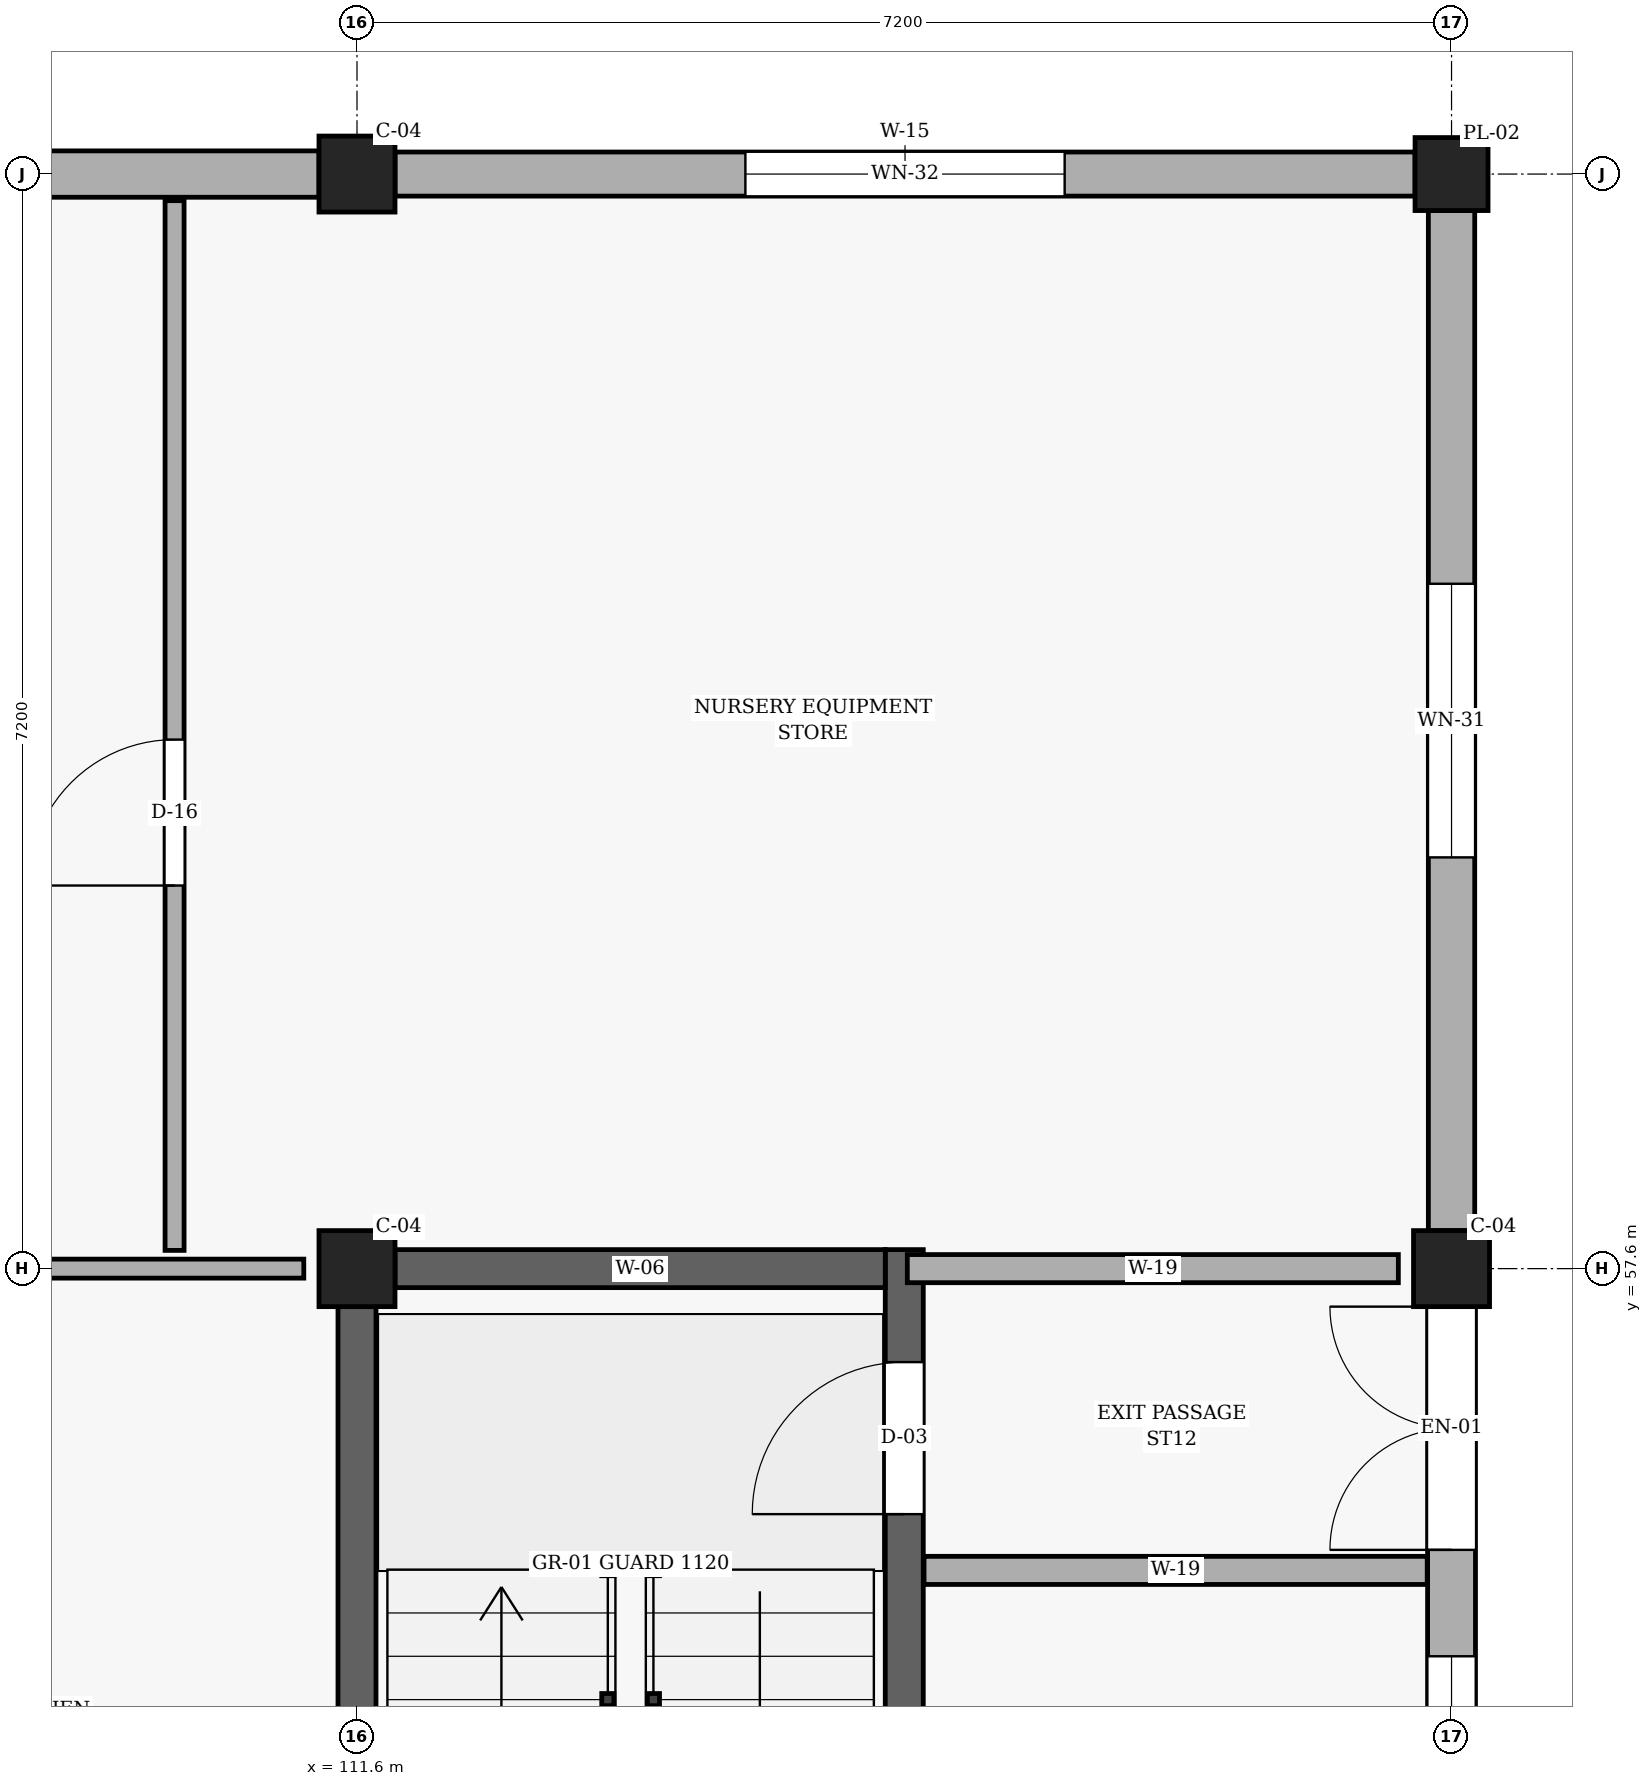
"""IFC4 building model, lengths in metres.
Left out: names, types, materials, properties, quantities, classifications, styles, units other than length and angle.
Written with IfcOpenShell. Run it as: python <this file> out.ifc"""

import sys

from ifc_helpers import new_model, si_unit, direction, frame, frame_2d, origin, origin_2d, place, context, subcontext, project, spatial, rectangle, extrude, element, fill, save


model = new_model("IFC4")
c1 = context("Model", 3, precision=1e-05, world=origin(), true_north=direction((0.0, 1.0)))
c2 = subcontext(c1, "Body", "Model", "MODEL_VIEW")
j1 = project(units=[si_unit("LENGTHUNIT", "METRE"), si_unit("PLANEANGLEUNIT", "RADIAN")], contexts=[c1])
p1 = place(None, origin())
s1 = spatial("IfcSite", under=j1, at=p1, CompositionType="ELEMENT")
p2 = place(p1, origin())
s2 = spatial("IfcBuilding", under=s1, at=p2, CompositionType="ELEMENT")
p3 = place(p2, origin())
s3 = spatial("IfcBuildingStorey", under=s2, at=p3, CompositionType="ELEMENT", Elevation=0.0)
for number, where, z_axis, x_axis in (
    (1, (111.6, 57.6, 0.0), (0.0, 0.0, 1.0), (1.0, 0.0, 0.0)),
    (2, (111.6, 64.8, 0.0), (0.0, 0.0, 1.0), (1.0, 0.0, 0.0)),
    (3, (118.8, 57.6, 0.0), (0.0, 0.0, 1.0), (1.0, 0.0, 0.0)),
):
    element("IfcColumn", number, at=place(p3, frame(where, z_axis=z_axis, x_axis=x_axis)), inside=s3, PredefinedType="COLUMN", context=c2, shape_type="SweptSolid", body=[
        extrude(rectangle(XDim=0.5, YDim=0.5, at=origin_2d()), origin(), (0.0, 0.0, 1.0), 4.5),
    ])
p4 = place(p3, frame((118.8, 64.8, 0.0), z_axis=(0.0, 0.0, 1.0), x_axis=(1.0, 0.0, 0.0)))
e4 = element("IfcColumn", 4, at=p4, inside=s3, PredefinedType="PILASTER", context=c2, shape_type="SweptSolid", body=[
    extrude(rectangle(XDim=0.48, YDim=0.48, at=origin_2d()), origin(), (0.0, 0.0, 1.0), 4.5),
])
p5 = place(p3, frame((118.8, 50.65, 0.0), z_axis=(0.0, 0.0, 1.0), x_axis=(0.0, 1.0, 0.0)))
e5 = element("IfcWall", 5, at=p5, inside=s3, PredefinedType="SOLIDWALL", context=c2, shape_type="SweptSolid", body=[
    extrude(rectangle(XDim=6.7, YDim=0.315, at=frame_2d((3.35, 0.0))), origin(), (0.0, 0.0, 1.0), 3.83),
])
p6 = place(p5, frame((2.3, 0.0, 0.85)))
e6 = element("IfcOpeningElement", 6, at=p6, cuts=e5, PredefinedType="OPENING", context=c2, shape_type="SweptSolid", body=[
    extrude(rectangle(XDim=2.1, YDim=2.1, at=frame_2d((1.05, 1.05))), frame((0.0, 0.167, 0.0), z_axis=(0.0, -1.0, 0.0), x_axis=(1.0, 0.0, 0.0)), (0.0, 0.0, 1.0), 0.335),
])
p7 = place(p5, frame((5.1, 0.0, 0.0)))
e7 = element("IfcOpeningElement", 7, at=p7, cuts=e5, PredefinedType="OPENING", context=c2, shape_type="SweptSolid", body=[
    extrude(rectangle(XDim=1.6, YDim=2.25, at=frame_2d((0.8, 1.125))), frame((0.0, 0.167, 0.0), z_axis=(0.0, -1.0, 0.0), x_axis=(1.0, 0.0, 0.0)), (0.0, 0.0, 1.0), 0.335),
])
p8 = place(p3, frame((118.8, 57.85, 0.0), z_axis=(0.0, 0.0, 1.0), x_axis=(0.0, 1.0, 0.0)))
e8 = element("IfcWall", 8, at=p8, inside=s3, PredefinedType="SOLIDWALL", context=c2, shape_type="SweptSolid", body=[
    extrude(rectangle(XDim=6.71, YDim=0.305, at=frame_2d((3.355, 0.0))), origin(), (0.0, 0.0, 1.0), 3.83),
])
p9 = place(p8, frame((2.455, 0.0, 0.85)))
e9 = element("IfcOpeningElement", 9, at=p9, cuts=e8, PredefinedType="OPENING", context=c2, shape_type="SweptSolid", body=[
    extrude(rectangle(XDim=1.8, YDim=2.1, at=frame_2d((0.9, 1.05))), frame((0.0, 0.163, 0.0), z_axis=(0.0, -1.0, 0.0), x_axis=(1.0, 0.0, 0.0)), (0.0, 0.0, 1.0), 0.325),
])
p10 = place(p3, frame((118.56, 64.8, 0.0), z_axis=(0.0, 0.0, 1.0), x_axis=(-1.0, 0.0, 0.0)))
e10 = element("IfcWall", 10, at=p10, inside=s3, PredefinedType="SOLIDWALL", context=c2, shape_type="SweptSolid", body=[
    extrude(rectangle(XDim=6.71, YDim=0.29, at=frame_2d((3.355, 0.0))), origin(), (0.0, 0.0, 1.0), 3.83),
])
p11 = place(p10, frame((2.305, 0.0, 0.85)))
e11 = element("IfcOpeningElement", 11, at=p11, cuts=e10, PredefinedType="OPENING", context=c2, shape_type="SweptSolid", body=[
    extrude(rectangle(XDim=2.1, YDim=2.1, at=frame_2d((1.05, 1.05))), frame((0.0, 0.155, 0.0), z_axis=(0.0, -1.0, 0.0), x_axis=(1.0, 0.0, 0.0)), (0.0, 0.0, 1.0), 0.31),
])
p12 = place(p3, frame((111.35, 64.8, 0.0), z_axis=(0.0, 0.0, 1.0), x_axis=(-1.0, 0.0, 0.0)))
e12 = element("IfcWall", 12, at=p12, inside=s3, PredefinedType="SOLIDWALL", context=c2, shape_type="SweptSolid", body=[
    extrude(rectangle(XDim=6.7, YDim=0.305, at=frame_2d((3.35, 0.0))), origin(), (0.0, 0.0, 1.0), 3.83),
])
p13 = place(p12, frame((2.855, 0.0, 0.85)))
e13 = element("IfcOpeningElement", 13, at=p13, cuts=e12, PredefinedType="OPENING", context=c2, shape_type="SweptSolid", body=[
    extrude(rectangle(XDim=1.8, YDim=2.1, at=frame_2d((0.9, 1.05))), frame((0.0, 0.163, 0.0), z_axis=(0.0, -1.0, 0.0), x_axis=(1.0, 0.0, 0.0)), (0.0, 0.0, 1.0), 0.325),
])
p14 = place(p3, frame((111.6, 50.65, 0.0), z_axis=(0.0, 0.0, 1.0), x_axis=(0.0, 1.0, 0.0)))
e14 = element("IfcWall", 14, at=p14, inside=s3, PredefinedType="SHEAR", context=c2, shape_type="SweptSolid", body=[
    extrude(rectangle(XDim=6.7, YDim=0.25, at=frame_2d((3.35, 0.0))), origin(), (0.0, 0.0, 1.0), 4.26),
])
p15 = place(p3, frame((115.2, 50.275, 0.0), z_axis=(0.0, 0.0, 1.0), x_axis=(0.0, 1.0, 0.0)))
e15 = element("IfcWall", 15, at=p15, inside=s3, PredefinedType="SHEAR", context=c2, shape_type="SweptSolid", body=[
    extrude(rectangle(XDim=7.45, YDim=0.25, at=frame_2d((3.725, 0.0))), origin(), (0.0, 0.0, 1.0), 4.26),
])
p16 = place(p15, frame((5.71, 0.0, 0.0)))
e16 = element("IfcOpeningElement", 16, at=p16, cuts=e15, PredefinedType="OPENING", context=c2, shape_type="SweptSolid", body=[
    extrude(rectangle(XDim=1.0, YDim=2.15, at=frame_2d((0.5, 1.075))), frame((0.0, 0.135, 0.0), z_axis=(0.0, -1.0, 0.0), x_axis=(1.0, 0.0, 0.0)), (0.0, 0.0, 1.0), 0.27),
])
p17 = place(p3, frame((111.85, 57.6, 0.0), z_axis=(0.0, 0.0, 1.0), x_axis=(1.0, 0.0, 0.0)))
e17 = element("IfcWall", 17, at=p17, inside=s3, PredefinedType="SHEAR", context=c2, shape_type="SweptSolid", body=[
    extrude(rectangle(XDim=3.225, YDim=0.25, at=frame_2d((1.612, 0.0))), origin(), (0.0, 0.0, 1.0), 4.26),
])
p18 = place(p3, frame((104.75, 57.6, 0.0), z_axis=(0.0, 0.0, 1.0), x_axis=(1.0, 0.0, 0.0)))
e18 = element("IfcWall", 18, at=p18, inside=s3, PredefinedType="PARTITIONING", context=c2, shape_type="SweptSolid", body=[
    extrude(rectangle(XDim=6.5, YDim=0.125, at=frame_2d((3.25, 0.0))), origin(), (0.0, 0.0, 1.0), 3.41),
])
p19 = place(p18, frame((0.55, 0.0, 0.0)))
e19 = element("IfcOpeningElement", 19, at=p19, cuts=e18, PredefinedType="OPENING", context=c2, shape_type="SweptSolid", body=[
    extrude(rectangle(XDim=1.04, YDim=2.12, at=frame_2d((0.52, 1.06))), frame((0.0, 0.073, 0.0), z_axis=(0.0, -1.0, 0.0), x_axis=(1.0, 0.0, 0.0)), (0.0, 0.0, 1.0), 0.145),
])
p20 = place(p3, frame((115.22, 57.6, 0.0), z_axis=(0.0, 0.0, 1.0), x_axis=(1.0, 0.0, 0.0)))
e20 = element("IfcWall", 20, at=p20, inside=s3, PredefinedType="PARTITIONING", context=c2, shape_type="SweptSolid", body=[
    extrude(rectangle(XDim=3.23, YDim=0.185, at=frame_2d((1.615, 0.0))), origin(), (0.0, 0.0, 1.0), 3.41),
])
p21 = place(p3, frame((110.4, 57.72, 0.0), z_axis=(0.0, 0.0, 1.0), x_axis=(0.0, 1.0, 0.0)))
e21 = element("IfcWall", 21, at=p21, inside=s3, PredefinedType="PARTITIONING", context=c2, shape_type="SweptSolid", body=[
    extrude(rectangle(XDim=6.905, YDim=0.125, at=frame_2d((3.453, 0.0))), origin(), (0.0, 0.0, 1.0), 3.41),
])
p22 = place(p21, frame((2.4, 0.0, 0.0)))
e22 = element("IfcOpeningElement", 22, at=p22, cuts=e21, PredefinedType="OPENING", context=c2, shape_type="SweptSolid", body=[
    extrude(rectangle(XDim=0.96, YDim=2.1, at=frame_2d((0.48, 1.05))), frame((0.0, 0.073, 0.0), z_axis=(0.0, -1.0, 0.0), x_axis=(1.0, 0.0, 0.0)), (0.0, 0.0, 1.0), 0.145),
])
p23 = place(p3, frame((115.33, 55.615, 0.0), z_axis=(0.0, 0.0, 1.0), x_axis=(1.0, 0.0, 0.0)))
e23 = element("IfcWall", 23, at=p23, inside=s3, PredefinedType="PARTITIONING", context=c2, shape_type="SweptSolid", body=[
    extrude(rectangle(XDim=3.31, YDim=0.185, at=frame_2d((1.655, 0.0))), origin(), (0.0, 0.0, 1.0), 3.41),
])
p24 = place(p6, origin())
e24 = element("IfcWindow", 24, at=p24, inside=s3, PartitioningType="SINGLE_PANEL", PredefinedType="WINDOW", context=c2, shape_type="SweptSolid", body=[
    extrude(rectangle(XDim=2.1, YDim=2.1, at=frame_2d((1.05, 1.05))), frame((0.0, 0.03, 0.0), z_axis=(0.0, -1.0, 0.0), x_axis=(1.0, 0.0, 0.0)), (0.0, 0.0, 1.0), 0.06),
])
fill(e6, e24)
p25 = place(p9, origin())
e25 = element("IfcWindow", 25, at=p25, inside=s3, PartitioningType="SINGLE_PANEL", PredefinedType="WINDOW", context=c2, shape_type="SweptSolid", body=[
    extrude(rectangle(XDim=1.8, YDim=2.1, at=frame_2d((0.9, 1.05))), frame((0.0, 0.03, 0.0), z_axis=(0.0, -1.0, 0.0), x_axis=(1.0, 0.0, 0.0)), (0.0, 0.0, 1.0), 0.06),
])
fill(e9, e25)
p26 = place(p11, origin())
e26 = element("IfcWindow", 26, at=p26, inside=s3, PartitioningType="SINGLE_PANEL", PredefinedType="WINDOW", context=c2, shape_type="SweptSolid", body=[
    extrude(rectangle(XDim=2.1, YDim=2.1, at=frame_2d((1.05, 1.05))), frame((0.0, 0.03, 0.0), z_axis=(0.0, -1.0, 0.0), x_axis=(1.0, 0.0, 0.0)), (0.0, 0.0, 1.0), 0.06),
])
fill(e11, e26)
p27 = place(p22, origin())
e27 = element("IfcDoor", 27, at=p27, inside=s3, OperationType="SINGLE_SWING_LEFT", PredefinedType="DOOR", context=c2, shape_type="SweptSolid", body=[
    extrude(rectangle(XDim=0.96, YDim=2.1, at=frame_2d((0.48, 1.05))), frame((0.0, 0.025, 0.0), z_axis=(0.0, -1.0, 0.0), x_axis=(1.0, 0.0, 0.0)), (0.0, 0.0, 1.0), 0.05),
])
fill(e22, e27)
p28 = place(p16, frame((1.0, 0.0, 0.0), z_axis=(0.0, 0.0, 1.0), x_axis=(-1.0, 0.0, 0.0)))
e28 = element("IfcDoor", 28, at=p28, inside=s3, OperationType="SINGLE_SWING_LEFT", PredefinedType="DOOR", context=c2, shape_type="SweptSolid", body=[
    extrude(rectangle(XDim=1.0, YDim=2.15, at=frame_2d((0.5, 1.075))), frame((0.0, 0.025, 0.0), z_axis=(0.0, -1.0, 0.0), x_axis=(1.0, 0.0, 0.0)), (0.0, 0.0, 1.0), 0.05),
])
fill(e16, e28)
p29 = place(p7, frame((1.6, 0.0, 0.0), z_axis=(0.0, 0.0, 1.0), x_axis=(-1.0, 0.0, 0.0)))
e29 = element("IfcDoor", 29, at=p29, inside=s3, OperationType="DOUBLE_DOOR_SINGLE_SWING", PredefinedType="DOOR", context=c2, shape_type="SweptSolid", body=[
    extrude(rectangle(XDim=1.6, YDim=2.25, at=frame_2d((0.8, 1.125))), frame((0.0, 0.025, 0.0), z_axis=(0.0, -1.0, 0.0), x_axis=(1.0, 0.0, 0.0)), (0.0, 0.0, 1.0), 0.05),
])
fill(e7, e29)
save(model, sys.argv[1])
